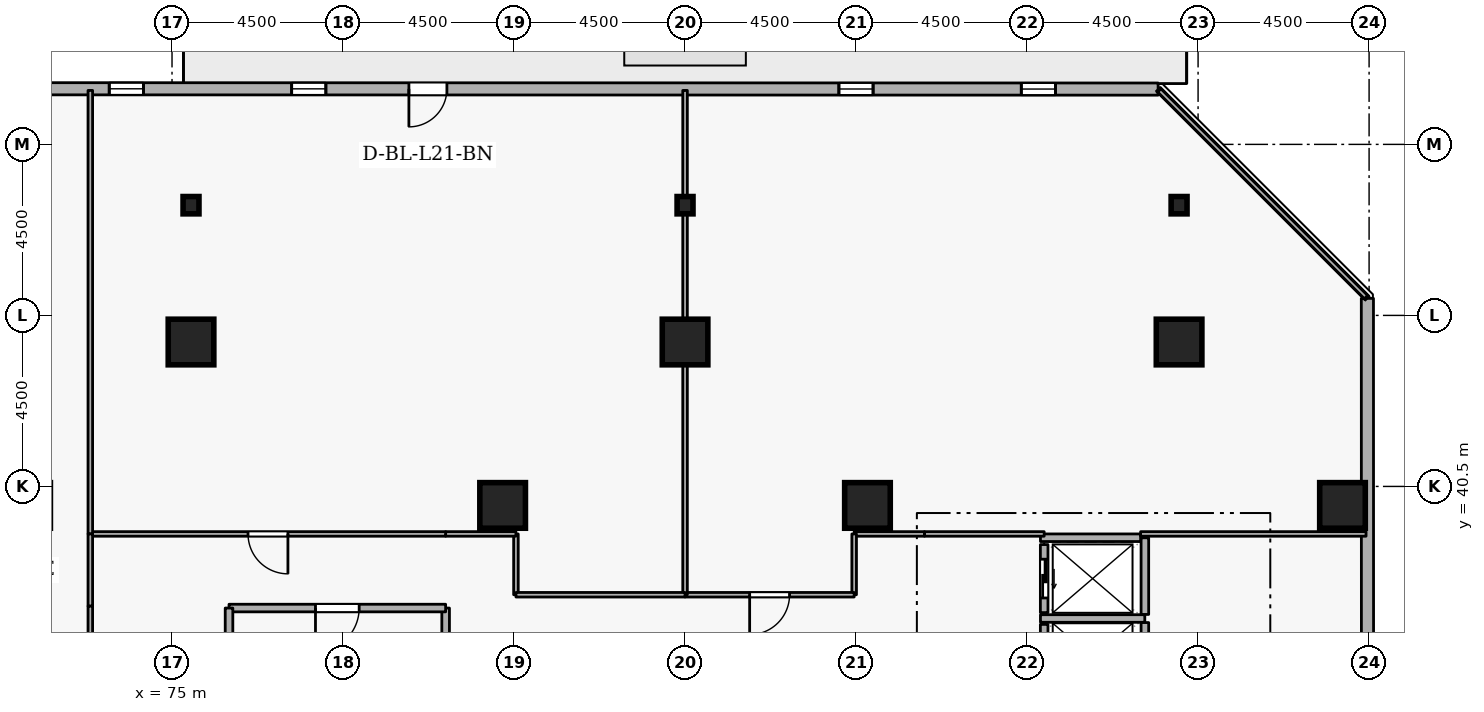
"""IFC4 building model, lengths in metres.
Left out: names, types, materials, properties, quantities, classifications, styles, units other than length and angle.
Written with IfcOpenShell. Run it as: python <this file> out.ifc"""

import sys

from ifc_helpers import new_model, si_unit, direction, frame, frame_2d, origin, origin_2d, place, context, subcontext, project, spatial, rectangle, i_section, extrude, element, fill, save


model = new_model("IFC4")
c1 = context("Model", 3, precision=1e-05, world=origin(), true_north=direction((0.0, 1.0)))
c2 = subcontext(c1, "Body", "Model", "MODEL_VIEW")
j1 = project(units=[si_unit("LENGTHUNIT", "METRE"), si_unit("PLANEANGLEUNIT", "RADIAN")], contexts=[c1])
p1 = place(None, origin())
s1 = spatial("IfcSite", under=j1, at=p1, CompositionType="ELEMENT")
p2 = place(p1, origin())
s2 = spatial("IfcBuilding", under=s1, at=p2, CompositionType="ELEMENT")
p3 = place(p2, frame((0.0, 0.0, 83.7)))
s3 = spatial("IfcBuildingStorey", under=s2, at=p3, CompositionType="ELEMENT", Elevation=83.7)
for number, where, z_axis, x_axis in (
    (1, (105.8, 40.0, 0.0), (0.0, 0.0, 1.0), (1.0, 0.0, 0.0)),
    (2, (101.5, 44.3, 0.0), (0.0, 0.0, 1.0), (1.0, 0.0, 0.0)),
    (3, (88.5, 44.3, 0.0), (0.0, 0.0, 1.0), (1.0, 0.0, 0.0)),
    (4, (75.5, 44.3, 0.0), (0.0, 0.0, 1.0), (1.0, 0.0, 0.0)),
    (5, (93.3, 40.0, 0.0), (0.0, 0.0, 1.0), (1.0, 0.0, 0.0)),
    (6, (83.7, 40.0, 0.0), (0.0, 0.0, 1.0), (1.0, 0.0, 0.0)),
):
    element("IfcColumn", number, at=place(p3, frame(where, z_axis=z_axis, x_axis=x_axis)), inside=s3, PredefinedType="COLUMN", context=c2, shape_type="SweptSolid", body=[
        extrude(rectangle(XDim=1.2, YDim=1.2, at=origin_2d()), origin(), (0.0, 0.0, 1.0), 3.6),
    ])
for number, where, z_axis, x_axis in (
    (7, (101.5, 47.9, 0.0), (0.0, 0.0, 1.0), (1.0, 0.0, 0.0)),
    (8, (88.5, 47.9, 0.0), (0.0, 0.0, 1.0), (1.0, 0.0, 0.0)),
    (9, (75.5, 47.9, 0.0), (0.0, 0.0, 1.0), (1.0, 0.0, 0.0)),
):
    element("IfcColumn", number, at=place(p3, frame(where, z_axis=z_axis, x_axis=x_axis)), inside=s3, PredefinedType="COLUMN", context=c2, shape_type="SweptSolid", body=[
        extrude(i_section(OverallWidth=0.418, OverallDepth=0.456, WebThickness=0.042, FlangeThickness=0.067, FilletRadius=0.015, at=origin_2d()), origin(), (0.0, 0.0, 1.0), 3.6),
    ])
p4 = place(p3, frame((106.465, 11.619, 0.0), z_axis=(0.0, 0.0, 1.0), x_axis=(-0.000281454314, 0.999999960392, 0.0)))
e10 = element("IfcWall", 10, at=p4, inside=s3, PredefinedType="STANDARD", context=c2, shape_type="SweptSolid", body=[
    extrude(rectangle(XDim=33.83, YDim=0.32, at=frame_2d((16.915, 0.0))), origin(), (0.0, 0.0, 1.0), 2.7),
])
p5 = place(p4, frame((7.5, 0.0, 0.72)))
e11 = element("IfcOpeningElement", 11, at=p5, cuts=e10, PredefinedType="OPENING", context=c2, shape_type="SweptSolid", body=[
    extrude(rectangle(XDim=0.9, YDim=1.75, at=frame_2d((0.45, 0.875))), frame((0.0, 0.17, 0.0), z_axis=(0.0, -1.0, 0.0), x_axis=(1.0, 0.0, 0.0)), (0.0, 0.0, 1.0), 0.34),
])
p6 = place(p4, frame((12.3, 0.0, 0.72)))
e12 = element("IfcOpeningElement", 12, at=p6, cuts=e10, PredefinedType="OPENING", context=c2, shape_type="SweptSolid", body=[
    extrude(rectangle(XDim=0.9, YDim=1.75, at=frame_2d((0.45, 0.875))), frame((0.0, 0.17, 0.0), z_axis=(0.0, -1.0, 0.0), x_axis=(1.0, 0.0, 0.0)), (0.0, 0.0, 1.0), 0.34),
])
p7 = place(p4, frame((17.1, 0.0, 0.72)))
e13 = element("IfcOpeningElement", 13, at=p7, cuts=e10, PredefinedType="OPENING", context=c2, shape_type="SweptSolid", body=[
    extrude(rectangle(XDim=0.9, YDim=1.75, at=frame_2d((0.45, 0.875))), frame((0.0, 0.17, 0.0), z_axis=(0.0, -1.0, 0.0), x_axis=(1.0, 0.0, 0.0)), (0.0, 0.0, 1.0), 0.34),
])
p8 = place(p4, frame((21.9, 0.0, 0.72)))
e14 = element("IfcOpeningElement", 14, at=p8, cuts=e10, PredefinedType="OPENING", context=c2, shape_type="SweptSolid", body=[
    extrude(rectangle(XDim=0.9, YDim=1.75, at=frame_2d((0.45, 0.875))), frame((0.0, 0.17, 0.0), z_axis=(0.0, -1.0, 0.0), x_axis=(1.0, 0.0, 0.0)), (0.0, 0.0, 1.0), 0.34),
])
p9 = place(p3, frame((100.948, 50.955, 0.0), z_axis=(0.0, 0.0, 1.0), x_axis=(-0.999999960392, 0.000281454314, 0.0)))
e15 = element("IfcWall", 15, at=p9, inside=s3, PredefinedType="STANDARD", context=c2, shape_type="SweptSolid", body=[
    extrude(rectangle(XDim=33.83, YDim=0.32, at=frame_2d((16.915, 0.0))), origin(), (0.0, 0.0, 1.0), 2.7),
])
p10 = place(p9, frame((18.715, 0.0, 0.0)))
e16 = element("IfcOpeningElement", 16, at=p10, cuts=e15, PredefinedType="OPENING", context=c2, shape_type="SweptSolid", body=[
    extrude(rectangle(XDim=1.0, YDim=2.08, at=frame_2d((0.5, 1.04))), frame((0.0, 0.17, 0.0), z_axis=(0.0, -1.0, 0.0), x_axis=(1.0, 0.0, 0.0)), (0.0, 0.0, 1.0), 0.34),
])
p11 = place(p9, frame((2.7, 0.0, 0.72)))
e17 = element("IfcOpeningElement", 17, at=p11, cuts=e15, PredefinedType="OPENING", context=c2, shape_type="SweptSolid", body=[
    extrude(rectangle(XDim=0.9, YDim=1.75, at=frame_2d((0.45, 0.875))), frame((0.0, 0.17, 0.0), z_axis=(0.0, -1.0, 0.0), x_axis=(1.0, 0.0, 0.0)), (0.0, 0.0, 1.0), 0.34),
])
p12 = place(p9, frame((7.5, 0.0, 0.72)))
e18 = element("IfcOpeningElement", 18, at=p12, cuts=e15, PredefinedType="OPENING", context=c2, shape_type="SweptSolid", body=[
    extrude(rectangle(XDim=0.9, YDim=1.75, at=frame_2d((0.45, 0.875))), frame((0.0, 0.17, 0.0), z_axis=(0.0, -1.0, 0.0), x_axis=(1.0, 0.0, 0.0)), (0.0, 0.0, 1.0), 0.34),
])
p13 = place(p9, frame((21.9, 0.0, 0.72)))
e19 = element("IfcOpeningElement", 19, at=p13, cuts=e15, PredefinedType="OPENING", context=c2, shape_type="SweptSolid", body=[
    extrude(rectangle(XDim=0.9, YDim=1.75, at=frame_2d((0.45, 0.875))), frame((0.0, 0.17, 0.0), z_axis=(0.0, -1.0, 0.0), x_axis=(1.0, 0.0, 0.0)), (0.0, 0.0, 1.0), 0.34),
])
p14 = place(p9, frame((26.7, 0.0, 0.72)))
e20 = element("IfcOpeningElement", 20, at=p14, cuts=e15, PredefinedType="OPENING", context=c2, shape_type="SweptSolid", body=[
    extrude(rectangle(XDim=0.9, YDim=1.75, at=frame_2d((0.45, 0.875))), frame((0.0, 0.17, 0.0), z_axis=(0.0, -1.0, 0.0), x_axis=(1.0, 0.0, 0.0)), (0.0, 0.0, 1.0), 0.34),
])
p15 = place(p3, frame((97.95, 36.87, 0.0), z_axis=(0.0, 0.0, 1.0), x_axis=(0.0, -1.0, 0.0)))
e21 = element("IfcWall", 21, at=p15, inside=s3, PredefinedType="STANDARD", context=c2, shape_type="SweptSolid", body=[
    extrude(rectangle(XDim=1.74, YDim=0.2, at=frame_2d((0.87, 0.0))), origin(), (0.0, 0.0, 1.0), 3.34),
])
p16 = place(p15, frame((0.36, 0.0, 0.0)))
e22 = element("IfcOpeningElement", 22, at=p16, cuts=e21, PredefinedType="OPENING", context=c2, shape_type="SweptSolid", body=[
    extrude(rectangle(XDim=1.02, YDim=2.06, at=frame_2d((0.51, 1.03))), frame((0.0, 0.11, 0.0), z_axis=(0.0, -1.0, 0.0), x_axis=(1.0, 0.0, 0.0)), (0.0, 0.0, 1.0), 0.22),
])
p17 = place(p3, frame((97.95, 38.97, 0.0), z_axis=(0.0, 0.0, 1.0), x_axis=(0.0, -1.0, 0.0)))
e23 = element("IfcWall", 23, at=p17, inside=s3, PredefinedType="STANDARD", context=c2, shape_type="SweptSolid", body=[
    extrude(rectangle(XDim=1.79, YDim=0.2, at=frame_2d((0.895, 0.0))), origin(), (0.0, 0.0, 1.0), 3.34),
])
p18 = place(p17, frame((0.385, 0.0, 0.0)))
e24 = element("IfcOpeningElement", 24, at=p18, cuts=e23, PredefinedType="OPENING", context=c2, shape_type="SweptSolid", body=[
    extrude(rectangle(XDim=1.02, YDim=2.06, at=frame_2d((0.51, 1.03))), frame((0.0, 0.11, 0.0), z_axis=(0.0, -1.0, 0.0), x_axis=(1.0, 0.0, 0.0)), (0.0, 0.0, 1.0), 0.22),
])
p19 = place(p3, frame((97.852, 37.025, 0.0), z_axis=(0.0, 0.0, 1.0), x_axis=(1.0, 0.0, 0.0)))
e25 = element("IfcWall", 25, at=p19, inside=s3, PredefinedType="STANDARD", context=c2, shape_type="SweptSolid", body=[
    extrude(rectangle(XDim=2.746, YDim=0.2, at=frame_2d((1.373, 0.0))), origin(), (0.0, 0.0, 1.0), 3.34),
])
p20 = place(p3, frame((100.6, 35.062, 0.0), z_axis=(0.0, 0.0, 1.0), x_axis=(0.0, 1.0, 0.0)))
e26 = element("IfcWall", 26, at=p20, inside=s3, PredefinedType="STANDARD", context=c2, shape_type="SweptSolid", body=[
    extrude(rectangle(XDim=1.856, YDim=0.2, at=frame_2d((0.928, 0.0))), origin(), (0.0, 0.0, 1.0), 3.34),
])
p21 = place(p3, frame((100.6, 37.132, 0.0), z_axis=(0.0, 0.0, 1.0), x_axis=(0.0, 1.0, 0.0)))
e27 = element("IfcWall", 27, at=p21, inside=s3, PredefinedType="STANDARD", context=c2, shape_type="SweptSolid", body=[
    extrude(rectangle(XDim=2.016, YDim=0.2, at=frame_2d((1.008, 0.0))), origin(), (0.0, 0.0, 1.0), 3.34),
])
p22 = place(p3, frame((97.852, 39.15, 0.0), z_axis=(0.0, 0.0, 1.0), x_axis=(1.0, 0.0, 0.0)))
e28 = element("IfcWall", 28, at=p22, inside=s3, PredefinedType="STANDARD", context=c2, shape_type="SweptSolid", body=[
    extrude(rectangle(XDim=2.636, YDim=0.2, at=frame_2d((1.318, 0.0))), origin(), (0.0, 0.0, 1.0), 3.34),
])
p23 = place(p3, frame((82.2, 34.8, 0.0), z_axis=(0.0, 0.0, 1.0), x_axis=(0.0, 1.0, 0.0)))
e29 = element("IfcWall", 29, at=p23, inside=s3, PredefinedType="STANDARD", context=c2, shape_type="SweptSolid", body=[
    extrude(rectangle(XDim=2.5, YDim=0.2, at=frame_2d((1.25, 0.0))), origin(), (0.0, 0.0, 1.0), 3.34),
])
p24 = place(p3, frame((82.2, 37.3, 0.0), z_axis=(0.0, 0.0, 1.0), x_axis=(-1.0, 0.0, 0.0)))
e30 = element("IfcWall", 30, at=p24, inside=s3, PredefinedType="STANDARD", context=c2, shape_type="SweptSolid", body=[
    extrude(rectangle(XDim=5.7, YDim=0.2, at=frame_2d((2.85, 0.0))), origin(), (0.0, 0.0, 1.0), 3.34),
])
p25 = place(p24, frame((2.275, 0.0, 0.0)))
e31 = element("IfcOpeningElement", 31, at=p25, cuts=e30, PredefinedType="OPENING", context=c2, shape_type="SweptSolid", body=[
    extrude(rectangle(XDim=1.15, YDim=2.1, at=frame_2d((0.575, 1.05))), frame((0.0, 0.11, 0.0), z_axis=(0.0, -1.0, 0.0), x_axis=(1.0, 0.0, 0.0)), (0.0, 0.0, 1.0), 0.22),
])
p26 = place(p3, frame((76.5, 37.3, 0.0), z_axis=(0.0, 0.0, 1.0), x_axis=(0.0, -1.0, 0.0)))
e32 = element("IfcWall", 32, at=p26, inside=s3, PredefinedType="STANDARD", context=c2, shape_type="SweptSolid", body=[
    extrude(rectangle(XDim=2.5, YDim=0.2, at=frame_2d((1.25, 0.0))), origin(), (0.0, 0.0, 1.0), 3.34),
])
p27 = place(p3, frame((106.42, 39.25, 0.0), z_axis=(0.0, 0.0, 1.0), x_axis=(-1.0, 0.0, 0.0)))
e33 = element("IfcWall", 33, at=p27, inside=s3, PredefinedType="PARTITIONING", context=c2, shape_type="SweptSolid", body=[
    extrude(rectangle(XDim=5.932, YDim=0.12, at=frame_2d((2.966, 0.0))), origin(), (0.0, 0.0, 1.0), 3.34),
])
p28 = place(p3, frame((97.95, 39.25, 0.0), z_axis=(0.0, 0.0, 1.0), x_axis=(-1.0, 0.0, 0.0)))
e34 = element("IfcWall", 34, at=p28, inside=s3, PredefinedType="PARTITIONING", context=c2, shape_type="SweptSolid", body=[
    extrude(rectangle(XDim=3.15, YDim=0.12, at=frame_2d((1.575, 0.0))), origin(), (0.0, 0.0, 1.0), 3.34),
])
p29 = place(p3, frame((94.8, 39.25, 0.0), z_axis=(0.0, 0.0, 1.0), x_axis=(-1.0, 0.0, 0.0)))
e35 = element("IfcWall", 35, at=p29, inside=s3, PredefinedType="PARTITIONING", context=c2, shape_type="SweptSolid", body=[
    extrude(rectangle(XDim=1.85, YDim=0.12, at=frame_2d((0.925, 0.0))), origin(), (0.0, 0.0, 1.0), 3.34),
])
p30 = place(p3, frame((92.95, 39.25, 0.0), z_axis=(0.0, 0.0, 1.0), x_axis=(0.0, -1.0, 0.0)))
e36 = element("IfcWall", 36, at=p30, inside=s3, PredefinedType="PARTITIONING", context=c2, shape_type="SweptSolid", body=[
    extrude(rectangle(XDim=1.6, YDim=0.12, at=frame_2d((0.8, 0.0))), origin(), (0.0, 0.0, 1.0), 3.34),
])
p31 = place(p3, frame((92.95, 37.65, 0.0), z_axis=(0.0, 0.0, 1.0), x_axis=(-1.0, 0.0, 0.0)))
e37 = element("IfcWall", 37, at=p31, inside=s3, PredefinedType="PARTITIONING", context=c2, shape_type="SweptSolid", body=[
    extrude(rectangle(XDim=4.45, YDim=0.12, at=frame_2d((2.225, 0.0))), origin(), (0.0, 0.0, 1.0), 3.34),
])
p32 = place(p31, frame((1.7, 0.0, 0.0)))
e38 = element("IfcOpeningElement", 38, at=p32, cuts=e37, PredefinedType="OPENING", context=c2, shape_type="SweptSolid", body=[
    extrude(rectangle(XDim=1.05, YDim=2.1, at=frame_2d((0.525, 1.05))), frame((0.0, 0.07, 0.0), z_axis=(0.0, -1.0, 0.0), x_axis=(1.0, 0.0, 0.0)), (0.0, 0.0, 1.0), 0.14),
])
p33 = place(p3, frame((88.5, 37.65, 0.0), z_axis=(0.0, 0.0, 1.0), x_axis=(0.0, 1.0, 0.0)))
e39 = element("IfcWall", 39, at=p33, inside=s3, PredefinedType="PARTITIONING", context=c2, shape_type="SweptSolid", body=[
    extrude(rectangle(XDim=13.27, YDim=0.12, at=frame_2d((6.635, 0.0))), origin(), (0.0, 0.0, 1.0), 2.882),
])
p34 = place(p3, frame((100.98, 50.92, 0.0), z_axis=(0.0, 0.0, 1.0), x_axis=(0.707106781187, -0.707106781187, 0.0)))
e40 = element("IfcWall", 40, at=p34, inside=s3, PredefinedType="PARTITIONING", context=c2, shape_type="SweptSolid", body=[
    extrude(rectangle(XDim=7.693, YDim=0.12, at=frame_2d((3.846, 0.0))), origin(), (0.0, 0.0, 1.0), 3.34),
])
p35 = place(p3, frame((84.05, 37.65, 0.0), z_axis=(0.0, 0.0, 1.0), x_axis=(0.0, 1.0, 0.0)))
e41 = element("IfcWall", 41, at=p35, inside=s3, PredefinedType="PARTITIONING", context=c2, shape_type="SweptSolid", body=[
    extrude(rectangle(XDim=1.6, YDim=0.12, at=frame_2d((0.8, 0.0))), origin(), (0.0, 0.0, 1.0), 3.34),
])
p36 = place(p3, frame((84.05, 39.25, 0.0), z_axis=(0.0, 0.0, 1.0), x_axis=(-1.0, 0.0, 0.0)))
e42 = element("IfcWall", 42, at=p36, inside=s3, PredefinedType="PARTITIONING", context=c2, shape_type="SweptSolid", body=[
    extrude(rectangle(XDim=1.85, YDim=0.12, at=frame_2d((0.925, 0.0))), origin(), (0.0, 0.0, 1.0), 3.34),
])
p37 = place(p3, frame((82.2, 39.25, 0.0), z_axis=(0.0, 0.0, 1.0), x_axis=(-1.0, 0.0, 0.0)))
e43 = element("IfcWall", 43, at=p37, inside=s3, PredefinedType="PARTITIONING", context=c2, shape_type="SweptSolid", body=[
    extrude(rectangle(XDim=9.35, YDim=0.12, at=frame_2d((4.675, 0.0))), origin(), (0.0, 0.0, 1.0), 3.34),
])
p38 = place(p37, frame((4.15, 0.0, 0.0)))
e44 = element("IfcOpeningElement", 44, at=p38, cuts=e43, PredefinedType="OPENING", context=c2, shape_type="SweptSolid", body=[
    extrude(rectangle(XDim=1.05, YDim=2.1, at=frame_2d((0.525, 1.05))), frame((0.0, 0.07, 0.0), z_axis=(0.0, -1.0, 0.0), x_axis=(1.0, 0.0, 0.0)), (0.0, 0.0, 1.0), 0.14),
])
p39 = place(p3, frame((72.85, 39.25, 0.0), z_axis=(0.0, 0.0, 1.0), x_axis=(0.0, 1.0, 0.0)))
e45 = element("IfcWall", 45, at=p39, inside=s3, PredefinedType="PARTITIONING", context=c2, shape_type="SweptSolid", body=[
    extrude(rectangle(XDim=11.67, YDim=0.12, at=frame_2d((5.835, 0.0))), origin(), (0.0, 0.0, 1.0), 3.34),
])
p40 = place(p3, frame((88.5, 37.65, 0.0), z_axis=(0.0, 0.0, 1.0), x_axis=(-1.0, 0.0, 0.0)))
e46 = element("IfcWall", 46, at=p40, inside=s3, PredefinedType="PARTITIONING", context=c2, shape_type="SweptSolid", body=[
    extrude(rectangle(XDim=4.45, YDim=0.12, at=frame_2d((2.225, 0.0))), origin(), (0.0, 0.0, 1.0), 3.34),
])
p41 = place(p3, frame((72.85, 39.25, 0.0), z_axis=(0.0, 0.0, 1.0), x_axis=(0.0, -1.0, 0.0)))
e47 = element("IfcWall", 47, at=p41, inside=s3, PredefinedType="PARTITIONING", context=c2, shape_type="SweptSolid", body=[
    extrude(rectangle(XDim=1.9, YDim=0.12, at=frame_2d((0.95, 0.0))), origin(), (0.0, 0.0, 1.0), 2.895),
])
p42 = place(p3, frame((72.85, 37.35, 0.0), z_axis=(0.0, 0.0, 1.0), x_axis=(0.0, -1.0, 0.0)))
e48 = element("IfcWall", 48, at=p42, inside=s3, PredefinedType="PARTITIONING", context=c2, shape_type="SweptSolid", body=[
    extrude(rectangle(XDim=10.35, YDim=0.12, at=frame_2d((5.175, 0.0))), origin(), (0.0, 0.0, 1.0), 2.895),
])
p43 = place(p42, frame((4.65, 0.0, 0.0)))
e49 = element("IfcOpeningElement", 49, at=p43, cuts=e48, PredefinedType="OPENING", context=c2, shape_type="SweptSolid", body=[
    extrude(rectangle(XDim=1.05, YDim=2.1, at=frame_2d((0.525, 1.05))), frame((0.0, 0.07, 0.0), z_axis=(0.0, -1.0, 0.0), x_axis=(1.0, 0.0, 0.0)), (0.0, 0.0, 1.0), 0.14),
])
p44 = place(p10, origin())
e50 = element("IfcDoor", 50, at=p44, inside=s3, OperationType="SINGLE_SWING_RIGHT", PredefinedType="DOOR", context=c2, shape_type="SweptSolid", body=[
    extrude(rectangle(XDim=1.0, YDim=2.08, at=frame_2d((0.5, 1.04))), frame((0.0, 0.025, 0.0), z_axis=(0.0, -1.0, 0.0), x_axis=(1.0, 0.0, 0.0)), (0.0, 0.0, 1.0), 0.05),
])
fill(e16, e50)
p45 = place(p11, origin())
e51 = element("IfcWindow", 51, at=p45, inside=s3, PartitioningType="SINGLE_PANEL", PredefinedType="WINDOW", context=c2, shape_type="SweptSolid", body=[
    extrude(rectangle(XDim=0.9, YDim=1.75, at=frame_2d((0.45, 0.875))), frame((0.0, 0.03, 0.0), z_axis=(0.0, -1.0, 0.0), x_axis=(1.0, 0.0, 0.0)), (0.0, 0.0, 1.0), 0.06),
])
fill(e17, e51)
p46 = place(p12, origin())
e52 = element("IfcWindow", 52, at=p46, inside=s3, PartitioningType="SINGLE_PANEL", PredefinedType="WINDOW", context=c2, shape_type="SweptSolid", body=[
    extrude(rectangle(XDim=0.9, YDim=1.75, at=frame_2d((0.45, 0.875))), frame((0.0, 0.03, 0.0), z_axis=(0.0, -1.0, 0.0), x_axis=(1.0, 0.0, 0.0)), (0.0, 0.0, 1.0), 0.06),
])
fill(e18, e52)
p47 = place(p13, origin())
e53 = element("IfcWindow", 53, at=p47, inside=s3, PartitioningType="SINGLE_PANEL", PredefinedType="WINDOW", context=c2, shape_type="SweptSolid", body=[
    extrude(rectangle(XDim=0.9, YDim=1.75, at=frame_2d((0.45, 0.875))), frame((0.0, 0.03, 0.0), z_axis=(0.0, -1.0, 0.0), x_axis=(1.0, 0.0, 0.0)), (0.0, 0.0, 1.0), 0.06),
])
fill(e19, e53)
p48 = place(p14, origin())
e54 = element("IfcWindow", 54, at=p48, inside=s3, PartitioningType="SINGLE_PANEL", PredefinedType="WINDOW", context=c2, shape_type="SweptSolid", body=[
    extrude(rectangle(XDim=0.9, YDim=1.75, at=frame_2d((0.45, 0.875))), frame((0.0, 0.03, 0.0), z_axis=(0.0, -1.0, 0.0), x_axis=(1.0, 0.0, 0.0)), (0.0, 0.0, 1.0), 0.06),
])
fill(e20, e54)
p49 = place(p18, origin())
e55 = element("IfcDoor", 55, at=p49, inside=s3, OperationType="SLIDING_TO_LEFT", PredefinedType="DOOR", context=c2, shape_type="SweptSolid", body=[
    extrude(rectangle(XDim=1.02, YDim=2.06, at=frame_2d((0.51, 1.03))), frame((0.0, 0.025, 0.0), z_axis=(0.0, -1.0, 0.0), x_axis=(1.0, 0.0, 0.0)), (0.0, 0.0, 1.0), 0.05),
])
fill(e24, e55)
p50 = place(p25, origin())
e56 = element("IfcDoor", 56, at=p50, inside=s3, OperationType="SINGLE_SWING_RIGHT", PredefinedType="DOOR", context=c2, shape_type="SweptSolid", body=[
    extrude(rectangle(XDim=1.15, YDim=2.1, at=frame_2d((0.575, 1.05))), frame((0.0, 0.025, 0.0), z_axis=(0.0, -1.0, 0.0), x_axis=(1.0, 0.0, 0.0)), (0.0, 0.0, 1.0), 0.05),
])
fill(e31, e56)
p51 = place(p32, origin())
e57 = element("IfcDoor", 57, at=p51, inside=s3, OperationType="SINGLE_SWING_RIGHT", PredefinedType="DOOR", context=c2, shape_type="SweptSolid", body=[
    extrude(rectangle(XDim=1.05, YDim=2.1, at=frame_2d((0.525, 1.05))), frame((0.0, 0.025, 0.0), z_axis=(0.0, -1.0, 0.0), x_axis=(1.0, 0.0, 0.0)), (0.0, 0.0, 1.0), 0.05),
])
fill(e38, e57)
p52 = place(p38, origin())
e58 = element("IfcDoor", 58, at=p52, inside=s3, OperationType="SINGLE_SWING_LEFT", PredefinedType="DOOR", context=c2, shape_type="SweptSolid", body=[
    extrude(rectangle(XDim=1.05, YDim=2.1, at=frame_2d((0.525, 1.05))), frame((0.0, 0.025, 0.0), z_axis=(0.0, -1.0, 0.0), x_axis=(1.0, 0.0, 0.0)), (0.0, 0.0, 1.0), 0.05),
])
fill(e44, e58)
save(model, sys.argv[1])
